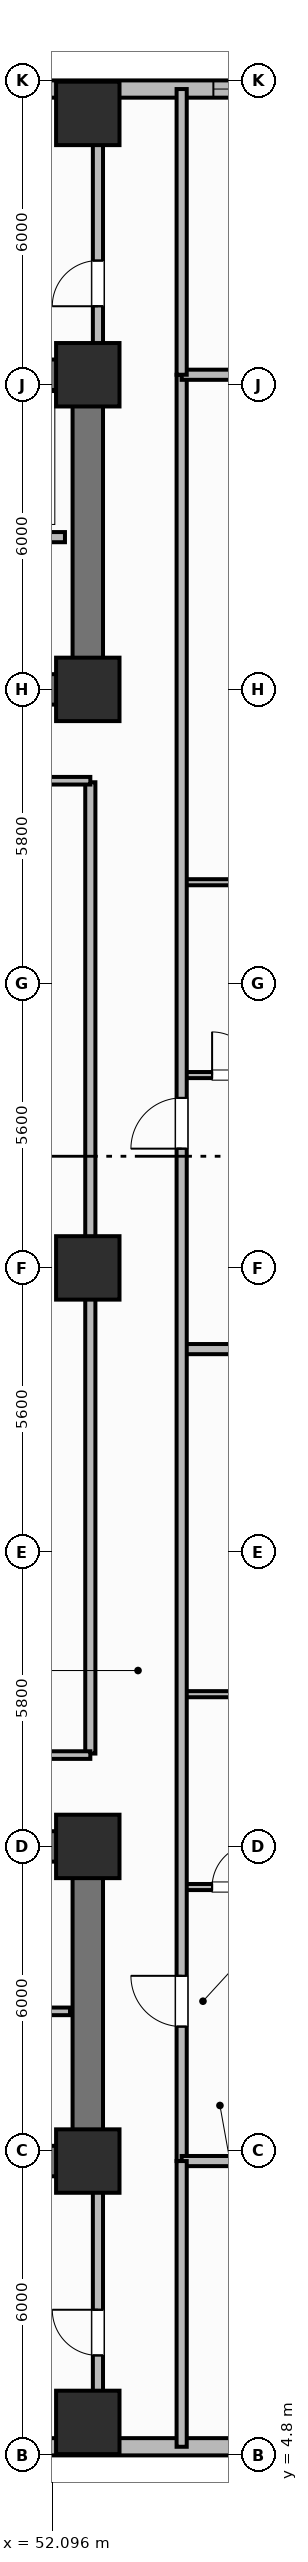
"""IFC4 building model, lengths in metres.
Left out: names, types, materials, properties, quantities, classifications, styles, units other than length and angle.
Written with IfcOpenShell. Run it as: python <this file> out.ifc"""

import sys

from ifc_helpers import new_model, si_unit, direction, frame, frame_2d, origin, origin_2d, place, context, subcontext, project, spatial, rectangle, extrude, element, fill, save


model = new_model("IFC4")
c1 = context("Model", 3, precision=1e-05, world=origin(), true_north=direction((0.0, 1.0)))
c2 = subcontext(c1, "Body", "Model", "MODEL_VIEW")
j1 = project(units=[si_unit("LENGTHUNIT", "METRE"), si_unit("PLANEANGLEUNIT", "RADIAN")], contexts=[c1])
p1 = place(None, origin())
s1 = spatial("IfcSite", under=j1, at=p1, CompositionType="ELEMENT")
p2 = place(p1, origin())
s2 = spatial("IfcBuilding", under=s1, at=p2, CompositionType="ELEMENT")
p3 = place(p2, frame((0.0, 0.0, 43.6)))
s3 = spatial("IfcBuildingStorey", under=s2, at=p3, CompositionType="ELEMENT", Elevation=43.6)
p4 = place(p3, frame((52.8, 10.6, 0.0), z_axis=(0.0, 0.0, 1.0), x_axis=(-1.0, 0.0, 0.0)))
e1 = element("IfcWall", 1, at=p4, inside=s3, PredefinedType="SHEAR", context=c2, shape_type="SweptSolid", body=[
    extrude(rectangle(XDim=27.2, YDim=0.6, at=frame_2d((13.6, 0.0))), origin(), (0.0, 0.0, 1.0), 3.7),
])
p5 = place(p3, frame((52.8, 10.9, 0.0), z_axis=(0.0, 0.0, 1.0), x_axis=(0.0, 1.0, 0.0)))
e2 = element("IfcWall", 2, at=p5, inside=s3, PredefinedType="SHEAR", context=c2, shape_type="SweptSolid", body=[
    extrude(rectangle(XDim=5.6, YDim=0.6, at=frame_2d((2.8, 0.0))), origin(), (0.0, 0.0, 1.0), 3.7),
])
p6 = place(p3, frame((25.6, 16.8, 0.0), z_axis=(0.0, 0.0, 1.0), x_axis=(1.0, 0.0, 0.0)))
e3 = element("IfcWall", 3, at=p6, inside=s3, PredefinedType="SHEAR", context=c2, shape_type="SweptSolid", body=[
    extrude(rectangle(XDim=27.2, YDim=0.6, at=frame_2d((13.6, 0.0))), origin(), (0.0, 0.0, 1.0), 3.7),
])
p7 = place(p6, frame((1.7, 0.0, 0.0)))
e4 = element("IfcOpeningElement", 4, at=p7, cuts=e3, PredefinedType="OPENING", context=c2, shape_type="SweptSolid", body=[
    extrude(rectangle(XDim=1.1, YDim=2.15, at=frame_2d((0.55, 1.075))), frame((0.0, 0.31, 0.0), z_axis=(0.0, -1.0, 0.0), x_axis=(1.0, 0.0, 0.0)), (0.0, 0.0, 1.0), 0.62),
])
p8 = place(p6, frame((4.45, 0.0, 0.0)))
e5 = element("IfcOpeningElement", 5, at=p8, cuts=e3, PredefinedType="OPENING", context=c2, shape_type="SweptSolid", body=[
    extrude(rectangle(XDim=0.85, YDim=2.1, at=frame_2d((0.425, 1.05))), frame((0.0, 0.31, 0.0), z_axis=(0.0, -1.0, 0.0), x_axis=(1.0, 0.0, 0.0)), (0.0, 0.0, 1.0), 0.62),
])
p9 = place(p6, frame((6.5, 0.0, 0.0)))
e6 = element("IfcOpeningElement", 6, at=p9, cuts=e3, PredefinedType="OPENING", context=c2, shape_type="SweptSolid", body=[
    extrude(rectangle(XDim=0.85, YDim=2.1, at=frame_2d((0.425, 1.05))), frame((0.0, 0.31, 0.0), z_axis=(0.0, -1.0, 0.0), x_axis=(1.0, 0.0, 0.0)), (0.0, 0.0, 1.0), 0.62),
])
p10 = place(p6, frame((13.0, 0.0, 0.0)))
e7 = element("IfcOpeningElement", 7, at=p10, cuts=e3, PredefinedType="OPENING", context=c2, shape_type="SweptSolid", body=[
    extrude(rectangle(XDim=1.2, YDim=2.15, at=frame_2d((0.6, 1.075))), frame((0.0, 0.31, 0.0), z_axis=(0.0, -1.0, 0.0), x_axis=(1.0, 0.0, 0.0)), (0.0, 0.0, 1.0), 0.62),
])
p11 = place(p6, frame((20.4, 0.0, 0.0)))
e8 = element("IfcOpeningElement", 8, at=p11, cuts=e3, PredefinedType="OPENING", context=c2, shape_type="SweptSolid", body=[
    extrude(rectangle(XDim=1.3, YDim=2.2, at=frame_2d((0.65, 1.1))), frame((0.0, 0.31, 0.0), z_axis=(0.0, -1.0, 0.0), x_axis=(1.0, 0.0, 0.0)), (0.0, 0.0, 1.0), 0.62),
])
p12 = place(p6, frame((24.65, 0.0, 0.0)))
e9 = element("IfcOpeningElement", 9, at=p12, cuts=e3, PredefinedType="OPENING", context=c2, shape_type="SweptSolid", body=[
    extrude(rectangle(XDim=0.85, YDim=2.1, at=frame_2d((0.425, 1.05))), frame((0.0, 0.31, 0.0), z_axis=(0.0, -1.0, 0.0), x_axis=(1.0, 0.0, 0.0)), (0.0, 0.0, 1.0), 0.62),
])
p13 = place(p3, frame((25.6, 45.8, 0.0), z_axis=(0.0, 0.0, 1.0), x_axis=(1.0, 0.0, 0.0)))
e10 = element("IfcWall", 10, at=p13, inside=s3, PredefinedType="SHEAR", context=c2, shape_type="SweptSolid", body=[
    extrude(rectangle(XDim=27.2, YDim=0.6, at=frame_2d((13.6, 0.0))), origin(), (0.0, 0.0, 1.0), 3.7),
])
p14 = place(p3, frame((52.8, 39.9, 0.0), z_axis=(0.0, 0.0, 1.0), x_axis=(0.0, 1.0, 0.0)))
e11 = element("IfcWall", 11, at=p14, inside=s3, PredefinedType="SHEAR", context=c2, shape_type="SweptSolid", body=[
    extrude(rectangle(XDim=5.6, YDim=0.6, at=frame_2d((2.8, 0.0))), origin(), (0.0, 0.0, 1.0), 3.7),
])
p15 = place(p3, frame((52.8, 39.6, 0.0), z_axis=(0.0, 0.0, 1.0), x_axis=(-1.0, 0.0, 0.0)))
e12 = element("IfcWall", 12, at=p15, inside=s3, PredefinedType="SHEAR", context=c2, shape_type="SweptSolid", body=[
    extrude(rectangle(XDim=27.2, YDim=0.6, at=frame_2d((13.6, 0.0))), origin(), (0.0, 0.0, 1.0), 3.7),
])
p16 = place(p15, frame((24.3, 0.0, 0.0)))
e13 = element("IfcOpeningElement", 13, at=p16, cuts=e12, PredefinedType="OPENING", context=c2, shape_type="SweptSolid", body=[
    extrude(rectangle(XDim=1.1, YDim=2.15, at=frame_2d((0.55, 1.075))), frame((0.0, 0.31, 0.0), z_axis=(0.0, -1.0, 0.0), x_axis=(1.0, 0.0, 0.0)), (0.0, 0.0, 1.0), 0.62),
])
p17 = place(p15, frame((21.85, 0.0, 0.0)))
e14 = element("IfcOpeningElement", 14, at=p17, cuts=e12, PredefinedType="OPENING", context=c2, shape_type="SweptSolid", body=[
    extrude(rectangle(XDim=0.85, YDim=2.1, at=frame_2d((0.425, 1.05))), frame((0.0, 0.31, 0.0), z_axis=(0.0, -1.0, 0.0), x_axis=(1.0, 0.0, 0.0)), (0.0, 0.0, 1.0), 0.62),
])
p18 = place(p15, frame((19.85, 0.0, 0.0)))
e15 = element("IfcOpeningElement", 15, at=p18, cuts=e12, PredefinedType="OPENING", context=c2, shape_type="SweptSolid", body=[
    extrude(rectangle(XDim=0.85, YDim=2.1, at=frame_2d((0.425, 1.05))), frame((0.0, 0.31, 0.0), z_axis=(0.0, -1.0, 0.0), x_axis=(1.0, 0.0, 0.0)), (0.0, 0.0, 1.0), 0.62),
])
p19 = place(p15, frame((15.1, 0.0, 0.0)))
e16 = element("IfcOpeningElement", 16, at=p19, cuts=e12, PredefinedType="OPENING", context=c2, shape_type="SweptSolid", body=[
    extrude(rectangle(XDim=1.2, YDim=2.15, at=frame_2d((0.6, 1.075))), frame((0.0, 0.31, 0.0), z_axis=(0.0, -1.0, 0.0), x_axis=(1.0, 0.0, 0.0)), (0.0, 0.0, 1.0), 0.62),
])
p20 = place(p15, frame((12.6, 0.0, 0.0)))
e17 = element("IfcOpeningElement", 17, at=p20, cuts=e12, PredefinedType="OPENING", context=c2, shape_type="SweptSolid", body=[
    extrude(rectangle(XDim=0.85, YDim=2.1, at=frame_2d((0.425, 1.05))), frame((0.0, 0.31, 0.0), z_axis=(0.0, -1.0, 0.0), x_axis=(1.0, 0.0, 0.0)), (0.0, 0.0, 1.0), 0.62),
])
p21 = place(p15, frame((10.85, 0.0, 0.0)))
e18 = element("IfcOpeningElement", 18, at=p21, cuts=e12, PredefinedType="OPENING", context=c2, shape_type="SweptSolid", body=[
    extrude(rectangle(XDim=0.85, YDim=2.1, at=frame_2d((0.425, 1.05))), frame((0.0, 0.31, 0.0), z_axis=(0.0, -1.0, 0.0), x_axis=(1.0, 0.0, 0.0)), (0.0, 0.0, 1.0), 0.62),
])
p22 = place(p15, frame((6.85, 0.0, 0.0)))
e19 = element("IfcOpeningElement", 19, at=p22, cuts=e12, PredefinedType="OPENING", context=c2, shape_type="SweptSolid", body=[
    extrude(rectangle(XDim=0.85, YDim=2.1, at=frame_2d((0.425, 1.05))), frame((0.0, 0.31, 0.0), z_axis=(0.0, -1.0, 0.0), x_axis=(1.0, 0.0, 0.0)), (0.0, 0.0, 1.0), 0.62),
])
p23 = place(p15, frame((2.0, 0.0, 0.0)))
e20 = element("IfcOpeningElement", 20, at=p23, cuts=e12, PredefinedType="OPENING", context=c2, shape_type="SweptSolid", body=[
    extrude(rectangle(XDim=0.85, YDim=2.1, at=frame_2d((0.425, 1.05))), frame((0.0, 0.31, 0.0), z_axis=(0.0, -1.0, 0.0), x_axis=(1.0, 0.0, 0.0)), (0.0, 0.0, 1.0), 0.62),
])
for number, where, z_axis, x_axis in (
    (21, (52.8, 10.6, 0.0), (0.0, 0.0, 1.0), (1.0, 0.0, 0.0)),
    (22, (52.8, 16.8, 0.0), (0.0, 0.0, 1.0), (1.0, 0.0, 0.0)),
    (23, (52.8, 39.6, 0.0), (0.0, 0.0, 1.0), (1.0, 0.0, 0.0)),
    (24, (52.8, 45.8, 0.0), (0.0, 0.0, 1.0), (1.0, 0.0, 0.0)),
    (25, (52.8, 28.2, 0.0), (0.0, 0.0, 1.0), (1.0, 0.0, 0.0)),
    (26, (52.8, 5.45, 0.0), (0.0, 0.0, 1.0), (1.0, 0.0, 0.0)),
    (27, (52.8, 50.95, 0.0), (0.0, 0.0, 1.0), (1.0, 0.0, 0.0)),
):
    element("IfcColumn", number, at=place(p3, frame(where, z_axis=z_axis, x_axis=x_axis)), inside=s3, PredefinedType="COLUMN", context=c2, shape_type="SweptSolid", body=[
        extrude(rectangle(XDim=1.25, YDim=1.25, at=origin_2d()), origin(), (0.0, 0.0, 1.0), 3.7),
    ])
p24 = place(p3, frame((42.4, 4.97, 0.0), z_axis=(0.0, 0.0, 1.0), x_axis=(1.0, 0.0, 0.0)))
e28 = element("IfcWall", 28, at=p24, inside=s3, PredefinedType="SOLIDWALL", context=c2, shape_type="SweptSolid", body=[
    extrude(rectangle(XDim=17.4, YDim=0.34, at=frame_2d((8.7, 0.0))), origin(), (0.0, 0.0, 1.0), 2.7),
])
p25 = place(p24, frame((2.06, 0.0, 0.73)))
e29 = element("IfcOpeningElement", 29, at=p25, cuts=e28, PredefinedType="OPENING", context=c2, shape_type="SweptSolid", body=[
    extrude(rectangle(XDim=1.8, YDim=1.85, at=frame_2d((0.9, 0.925))), frame((0.0, 0.18, 0.0), z_axis=(0.0, -1.0, 0.0), x_axis=(1.0, 0.0, 0.0)), (0.0, 0.0, 1.0), 0.36),
])
p26 = place(p24, frame((5.28, 0.0, 0.73)))
e30 = element("IfcOpeningElement", 30, at=p26, cuts=e28, PredefinedType="OPENING", context=c2, shape_type="SweptSolid", body=[
    extrude(rectangle(XDim=1.8, YDim=1.85, at=frame_2d((0.9, 0.925))), frame((0.0, 0.18, 0.0), z_axis=(0.0, -1.0, 0.0), x_axis=(1.0, 0.0, 0.0)), (0.0, 0.0, 1.0), 0.36),
])
p27 = place(p24, frame((14.24, 0.0, 0.73)))
e31 = element("IfcOpeningElement", 31, at=p27, cuts=e28, PredefinedType="OPENING", context=c2, shape_type="SweptSolid", body=[
    extrude(rectangle(XDim=1.8, YDim=1.85, at=frame_2d((0.9, 0.925))), frame((0.0, 0.18, 0.0), z_axis=(0.0, -1.0, 0.0), x_axis=(1.0, 0.0, 0.0)), (0.0, 0.0, 1.0), 0.36),
])
p28 = place(p3, frame((59.8, 51.43, 0.0), z_axis=(0.0, 0.0, 1.0), x_axis=(-1.0, 0.0, 0.0)))
e32 = element("IfcWall", 32, at=p28, inside=s3, PredefinedType="SOLIDWALL", context=c2, shape_type="SweptSolid", body=[
    extrude(rectangle(XDim=17.4, YDim=0.34, at=frame_2d((8.7, 0.0))), origin(), (0.0, 0.0, 1.0), 2.7),
])
p29 = place(p28, frame((1.442, 0.0, 0.93)))
e33 = element("IfcOpeningElement", 33, at=p29, cuts=e32, PredefinedType="OPENING", context=c2, shape_type="SweptSolid", body=[
    extrude(rectangle(XDim=1.1, YDim=1.65, at=frame_2d((0.55, 0.825))), frame((0.0, 0.18, 0.0), z_axis=(0.0, -1.0, 0.0), x_axis=(1.0, 0.0, 0.0)), (0.0, 0.0, 1.0), 0.36),
])
p30 = place(p28, frame((3.425, 0.0, 0.93)))
e34 = element("IfcOpeningElement", 34, at=p30, cuts=e32, PredefinedType="OPENING", context=c2, shape_type="SweptSolid", body=[
    extrude(rectangle(XDim=1.1, YDim=1.65, at=frame_2d((0.55, 0.825))), frame((0.0, 0.18, 0.0), z_axis=(0.0, -1.0, 0.0), x_axis=(1.0, 0.0, 0.0)), (0.0, 0.0, 1.0), 0.36),
])
p31 = place(p28, frame((9.492, 0.0, 0.93)))
e35 = element("IfcOpeningElement", 35, at=p31, cuts=e32, PredefinedType="OPENING", context=c2, shape_type="SweptSolid", body=[
    extrude(rectangle(XDim=1.1, YDim=1.65, at=frame_2d((0.55, 0.825))), frame((0.0, 0.18, 0.0), z_axis=(0.0, -1.0, 0.0), x_axis=(1.0, 0.0, 0.0)), (0.0, 0.0, 1.0), 0.36),
])
p32 = place(p28, frame((12.875, 0.0, 0.93)))
e36 = element("IfcOpeningElement", 36, at=p32, cuts=e32, PredefinedType="OPENING", context=c2, shape_type="SweptSolid", body=[
    extrude(rectangle(XDim=1.1, YDim=1.65, at=frame_2d((0.55, 0.825))), frame((0.0, 0.18, 0.0), z_axis=(0.0, -1.0, 0.0), x_axis=(1.0, 0.0, 0.0)), (0.0, 0.0, 1.0), 0.36),
])
p33 = place(p3, frame((49.6, 13.55, 0.0), z_axis=(0.0, 0.0, 1.0), x_axis=(1.0, 0.0, 0.0)))
e37 = element("IfcWall", 37, at=p33, inside=s3, PredefinedType="PARTITIONING", context=c2, shape_type="SweptSolid", body=[
    extrude(rectangle(XDim=2.85, YDim=0.15, at=frame_2d((1.425, 0.0))), origin(), (0.0, 0.0, 1.0), 2.53),
])
p34 = place(p33, frame((0.9, 0.0, 0.0)))
e38 = element("IfcOpeningElement", 38, at=p34, cuts=e37, PredefinedType="OPENING", context=c2, shape_type="SweptSolid", body=[
    extrude(rectangle(XDim=0.85, YDim=2.1, at=frame_2d((0.425, 1.05))), frame((0.0, 0.085, 0.0), z_axis=(0.0, -1.0, 0.0), x_axis=(1.0, 0.0, 0.0)), (0.0, 0.0, 1.0), 0.17),
])
p35 = place(p3, frame((52.35, 42.6, 0.0), z_axis=(0.0, 0.0, 1.0), x_axis=(-1.0, 0.0, 0.0)))
e39 = element("IfcWall", 39, at=p35, inside=s3, PredefinedType="PARTITIONING", context=c2, shape_type="SweptSolid", body=[
    extrude(rectangle(XDim=8.8, YDim=0.2, at=frame_2d((4.4, 0.0))), origin(), (0.0, 0.0, 1.0), 2.53),
])
p36 = place(p3, frame((52.85, 18.63, 0.0), z_axis=(0.0, 0.0, 1.0), x_axis=(0.0, 1.0, 0.0)))
e40 = element("IfcWall", 40, at=p36, inside=s3, PredefinedType="PARTITIONING", context=c2, shape_type="SweptSolid", body=[
    extrude(rectangle(XDim=19.14, YDim=0.2, at=frame_2d((9.57, 0.0))), origin(), (0.0, 0.0, 1.0), 2.53),
])
for number, where, z_axis, x_axis in (
    (41, (42.75, 18.6, 0.0), (0.0, 0.0, 1.0), (1.0, 0.0, 0.0)),
    (42, (42.75, 37.8, 0.0), (0.0, 0.0, 1.0), (1.0, 0.0, 0.0)),
):
    element("IfcWall", number, at=place(p3, frame(where, z_axis=z_axis, x_axis=x_axis)), inside=s3, PredefinedType="PARTITIONING", context=c2, shape_type="SweptSolid", body=[
        extrude(rectangle(XDim=10.1, YDim=0.15, at=frame_2d((5.05, 0.0))), origin(), (0.0, 0.0, 1.0), 2.53),
    ])
p37 = place(p3, frame((54.65, 16.0, 0.0), z_axis=(0.0, 0.0, 1.0), x_axis=(1.0, 0.0, 0.0)))
e43 = element("IfcWall", 43, at=p37, inside=s3, PredefinedType="PARTITIONING", context=c2, shape_type="SweptSolid", body=[
    extrude(rectangle(XDim=2.25, YDim=0.12, at=frame_2d((1.125, 0.0))), origin(), (0.0, 0.0, 1.0), 2.53),
])
p38 = place(p37, frame((0.6, 0.0, 0.0)))
e44 = element("IfcOpeningElement", 44, at=p38, cuts=e43, PredefinedType="OPENING", context=c2, shape_type="SweptSolid", body=[
    extrude(rectangle(XDim=0.85, YDim=2.1, at=frame_2d((0.425, 1.05))), frame((0.0, 0.07, 0.0), z_axis=(0.0, -1.0, 0.0), x_axis=(1.0, 0.0, 0.0)), (0.0, 0.0, 1.0), 0.14),
])
p39 = place(p3, frame((54.65, 19.8, 0.0), z_axis=(0.0, 0.0, 1.0), x_axis=(1.0, 0.0, 0.0)))
e45 = element("IfcWall", 45, at=p39, inside=s3, PredefinedType="PARTITIONING", context=c2, shape_type="SweptSolid", body=[
    extrude(rectangle(XDim=2.25, YDim=0.12, at=frame_2d((1.125, 0.0))), origin(), (0.0, 0.0, 1.0), 2.53),
])
p40 = place(p3, frame((54.65, 26.6, 0.0), z_axis=(0.0, 0.0, 1.0), x_axis=(1.0, 0.0, 0.0)))
e46 = element("IfcWall", 46, at=p40, inside=s3, PredefinedType="PARTITIONING", context=c2, shape_type="SweptSolid", body=[
    extrude(rectangle(XDim=8.666, YDim=0.2, at=frame_2d((4.333, 0.0))), origin(), (0.0, 0.0, 1.0), 2.53),
])
p41 = place(p3, frame((54.65, 32.0, 0.0), z_axis=(0.0, 0.0, 1.0), x_axis=(1.0, 0.0, 0.0)))
e47 = element("IfcWall", 47, at=p41, inside=s3, PredefinedType="PARTITIONING", context=c2, shape_type="SweptSolid", body=[
    extrude(rectangle(XDim=2.25, YDim=0.12, at=frame_2d((1.125, 0.0))), origin(), (0.0, 0.0, 1.0), 2.53),
])
p42 = place(p41, frame((0.6, 0.0, 0.0)))
e48 = element("IfcOpeningElement", 48, at=p42, cuts=e47, PredefinedType="OPENING", context=c2, shape_type="SweptSolid", body=[
    extrude(rectangle(XDim=0.85, YDim=2.1, at=frame_2d((0.425, 1.05))), frame((0.0, 0.07, 0.0), z_axis=(0.0, -1.0, 0.0), x_axis=(1.0, 0.0, 0.0)), (0.0, 0.0, 1.0), 0.14),
])
p43 = place(p3, frame((54.65, 35.8, 0.0), z_axis=(0.0, 0.0, 1.0), x_axis=(1.0, 0.0, 0.0)))
e49 = element("IfcWall", 49, at=p43, inside=s3, PredefinedType="PARTITIONING", context=c2, shape_type="SweptSolid", body=[
    extrude(rectangle(XDim=2.25, YDim=0.12, at=frame_2d((1.125, 0.0))), origin(), (0.0, 0.0, 1.0), 2.53),
])
p44 = place(p3, frame((54.65, 10.6, 0.0), z_axis=(0.0, 0.0, 1.0), x_axis=(0.0, 1.0, 0.0)))
e50 = element("IfcWall", 50, at=p44, inside=s3, PredefinedType="PARTITIONING", context=c2, shape_type="SweptSolid", body=[
    extrude(rectangle(XDim=35.2, YDim=0.2, at=frame_2d((17.6, 0.0))), origin(), (0.0, 0.0, 1.0), 2.53),
])
p45 = place(p44, frame((2.65, 0.0, 0.0)))
e51 = element("IfcOpeningElement", 51, at=p45, cuts=e50, PredefinedType="OPENING", context=c2, shape_type="SweptSolid", body=[
    extrude(rectangle(XDim=1.0, YDim=2.15, at=frame_2d((0.5, 1.075))), frame((0.0, 0.11, 0.0), z_axis=(0.0, -1.0, 0.0), x_axis=(1.0, 0.0, 0.0)), (0.0, 0.0, 1.0), 0.22),
])
p46 = place(p44, frame((19.95, 0.0, 0.0)))
e52 = element("IfcOpeningElement", 52, at=p46, cuts=e50, PredefinedType="OPENING", context=c2, shape_type="SweptSolid", body=[
    extrude(rectangle(XDim=1.0, YDim=2.15, at=frame_2d((0.5, 1.075))), frame((0.0, 0.11, 0.0), z_axis=(0.0, -1.0, 0.0), x_axis=(1.0, 0.0, 0.0)), (0.0, 0.0, 1.0), 0.22),
])
for number, where, z_axis, x_axis in (
    (53, (54.65, 10.6, 0.0), (0.0, 0.0, 1.0), (1.0, 0.0, 0.0)),
    (54, (54.65, 45.8, 0.0), (0.0, 0.0, 1.0), (1.0, 0.0, 0.0)),
):
    element("IfcWall", number, at=place(p3, frame(where, z_axis=z_axis, x_axis=x_axis)), inside=s3, PredefinedType="PARTITIONING", context=c2, shape_type="SweptSolid", body=[
        extrude(rectangle(XDim=8.76, YDim=0.2, at=frame_2d((4.38, 0.0))), origin(), (0.0, 0.0, 1.0), 2.53),
    ])
p47 = place(p3, frame((54.65, 4.97, 0.0), z_axis=(0.0, 0.0, 1.0), x_axis=(0.0, 1.0, 0.0)))
e55 = element("IfcWall", 55, at=p47, inside=s3, PredefinedType="PARTITIONING", context=c2, shape_type="SweptSolid", body=[
    extrude(rectangle(XDim=5.63, YDim=0.2, at=frame_2d((2.815, 0.0))), origin(), (0.0, 0.0, 1.0), 2.53),
])
p48 = place(p3, frame((54.65, 45.8, 0.0), z_axis=(0.0, 0.0, 1.0), x_axis=(0.0, 1.0, 0.0)))
e56 = element("IfcWall", 56, at=p48, inside=s3, PredefinedType="PARTITIONING", context=c2, shape_type="SweptSolid", body=[
    extrude(rectangle(XDim=5.63, YDim=0.2, at=frame_2d((2.815, 0.0))), origin(), (0.0, 0.0, 1.0), 2.53),
])
p49 = place(p3, frame((53.0, 5.92, 0.0), z_axis=(0.0, 0.0, 1.0), x_axis=(0.0, 1.0, 0.0)))
e57 = element("IfcWall", 57, at=p49, inside=s3, PredefinedType="PARTITIONING", context=c2, shape_type="SweptSolid", body=[
    extrude(rectangle(XDim=4.38, YDim=0.2, at=frame_2d((2.19, 0.0))), origin(), (0.0, 0.0, 1.0), 2.53),
])
p50 = place(p49, frame((0.85, 0.0, 0.0)))
e58 = element("IfcOpeningElement", 58, at=p50, cuts=e57, PredefinedType="OPENING", context=c2, shape_type="SweptSolid", body=[
    extrude(rectangle(XDim=0.9, YDim=2.1, at=frame_2d((0.45, 1.05))), frame((0.0, 0.11, 0.0), z_axis=(0.0, -1.0, 0.0), x_axis=(1.0, 0.0, 0.0)), (0.0, 0.0, 1.0), 0.22),
])
p51 = place(p3, frame((53.0, 46.1, 0.0), z_axis=(0.0, 0.0, 1.0), x_axis=(0.0, 1.0, 0.0)))
e59 = element("IfcWall", 59, at=p51, inside=s3, PredefinedType="PARTITIONING", context=c2, shape_type="SweptSolid", body=[
    extrude(rectangle(XDim=4.38, YDim=0.2, at=frame_2d((2.19, 0.0))), origin(), (0.0, 0.0, 1.0), 2.53),
])
p52 = place(p51, frame((1.05, 0.0, 0.0)))
e60 = element("IfcOpeningElement", 60, at=p52, cuts=e59, PredefinedType="OPENING", context=c2, shape_type="SweptSolid", body=[
    extrude(rectangle(XDim=0.9, YDim=2.1, at=frame_2d((0.45, 1.05))), frame((0.0, 0.11, 0.0), z_axis=(0.0, -1.0, 0.0), x_axis=(1.0, 0.0, 0.0)), (0.0, 0.0, 1.0), 0.22),
])
p53 = place(p30, origin())
e61 = element("IfcWindow", 61, at=p53, inside=s3, PartitioningType="SINGLE_PANEL", PredefinedType="WINDOW", context=c2, shape_type="SweptSolid", body=[
    extrude(rectangle(XDim=1.1, YDim=1.65, at=frame_2d((0.55, 0.825))), frame((0.0, 0.03, 0.0), z_axis=(0.0, -1.0, 0.0), x_axis=(1.0, 0.0, 0.0)), (0.0, 0.0, 1.0), 0.06),
])
fill(e34, e61)
p54 = place(p38, origin())
e62 = element("IfcDoor", 62, at=p54, inside=s3, OperationType="SINGLE_SWING_RIGHT", PredefinedType="DOOR", context=c2, shape_type="SweptSolid", body=[
    extrude(rectangle(XDim=0.85, YDim=2.1, at=frame_2d((0.425, 1.05))), frame((0.0, 0.025, 0.0), z_axis=(0.0, -1.0, 0.0), x_axis=(1.0, 0.0, 0.0)), (0.0, 0.0, 1.0), 0.05),
])
fill(e44, e62)
p55 = place(p42, origin())
e63 = element("IfcDoor", 63, at=p55, inside=s3, OperationType="SINGLE_SWING_LEFT", PredefinedType="DOOR", context=c2, shape_type="SweptSolid", body=[
    extrude(rectangle(XDim=0.85, YDim=2.1, at=frame_2d((0.425, 1.05))), frame((0.0, 0.025, 0.0), z_axis=(0.0, -1.0, 0.0), x_axis=(1.0, 0.0, 0.0)), (0.0, 0.0, 1.0), 0.05),
])
fill(e48, e63)
p56 = place(p45, origin())
e64 = element("IfcDoor", 64, at=p56, inside=s3, OperationType="SINGLE_SWING_RIGHT", PredefinedType="DOOR", context=c2, shape_type="SweptSolid", body=[
    extrude(rectangle(XDim=1.0, YDim=2.15, at=frame_2d((0.5, 1.075))), frame((0.0, 0.025, 0.0), z_axis=(0.0, -1.0, 0.0), x_axis=(1.0, 0.0, 0.0)), (0.0, 0.0, 1.0), 0.05),
])
fill(e51, e64)
p57 = place(p46, origin())
e65 = element("IfcDoor", 65, at=p57, inside=s3, OperationType="SINGLE_SWING_LEFT", PredefinedType="DOOR", context=c2, shape_type="SweptSolid", body=[
    extrude(rectangle(XDim=1.0, YDim=2.15, at=frame_2d((0.5, 1.075))), frame((0.0, 0.025, 0.0), z_axis=(0.0, -1.0, 0.0), x_axis=(1.0, 0.0, 0.0)), (0.0, 0.0, 1.0), 0.05),
])
fill(e52, e65)
p58 = place(p50, origin())
e66 = element("IfcDoor", 66, at=p58, inside=s3, OperationType="SINGLE_SWING_RIGHT", PredefinedType="DOOR", context=c2, shape_type="SweptSolid", body=[
    extrude(rectangle(XDim=0.9, YDim=2.1, at=frame_2d((0.45, 1.05))), frame((0.0, 0.025, 0.0), z_axis=(0.0, -1.0, 0.0), x_axis=(1.0, 0.0, 0.0)), (0.0, 0.0, 1.0), 0.05),
])
fill(e58, e66)
p59 = place(p52, origin())
e67 = element("IfcDoor", 67, at=p59, inside=s3, OperationType="SINGLE_SWING_LEFT", PredefinedType="DOOR", context=c2, shape_type="SweptSolid", body=[
    extrude(rectangle(XDim=0.9, YDim=2.1, at=frame_2d((0.45, 1.05))), frame((0.0, 0.025, 0.0), z_axis=(0.0, -1.0, 0.0), x_axis=(1.0, 0.0, 0.0)), (0.0, 0.0, 1.0), 0.05),
])
fill(e60, e67)
save(model, sys.argv[1])
